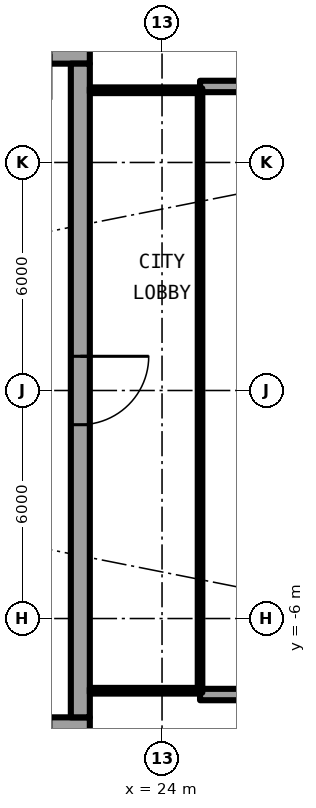
"""IFC4 building model, lengths in metres.
Left out: names, types, materials, properties, quantities, classifications, styles, units other than length and angle.
Written with IfcOpenShell. Run it as: python <this file> out.ifc"""

import sys

from ifc_helpers import new_model, si_unit, direction, frame, frame_2d, origin, place, context, subcontext, project, spatial, rectangle, extrude, element, fill, save


model = new_model("IFC4")
c1 = context("Model", 3, precision=1e-05, world=origin(), true_north=direction((0.0, 1.0)))
c2 = subcontext(c1, "Body", "Model", "MODEL_VIEW")
j1 = project(units=[si_unit("LENGTHUNIT", "METRE"), si_unit("PLANEANGLEUNIT", "RADIAN")], contexts=[c1])
p1 = place(None, origin())
s1 = spatial("IfcSite", under=j1, at=p1, CompositionType="ELEMENT")
p2 = place(p1, origin())
s2 = spatial("IfcBuilding", under=s1, at=p2, CompositionType="ELEMENT")
p3 = place(p2, frame((0.0, 0.0, 161.6)))
s3 = spatial("IfcBuildingStorey", under=s2, at=p3, CompositionType="ELEMENT", Elevation=161.6)
for number, where, z_axis, x_axis in (
    (1, (25.0, 8.0, 0.0), (0.0, 0.0, 1.0), (1.0, 0.0, 0.0)),
    (2, (25.0, -8.0, 0.0), (0.0, 0.0, 1.0), (1.0, 0.0, 0.0)),
):
    element("IfcWall", number, at=place(p3, frame(where, z_axis=z_axis, x_axis=x_axis)), inside=s3, PredefinedType="SOLIDWALL", context=c2, shape_type="SweptSolid", body=[
        extrude(rectangle(XDim=2.667, YDim=0.3, at=frame_2d((1.333, 0.0))), origin(), (0.0, 0.0, 1.0), 2.7),
    ])
p4 = place(p3, frame((22.1, 8.85, 0.0), z_axis=(0.0, 0.0, 1.0), x_axis=(-1.0, 0.0, 0.0)))
e3 = element("IfcWall", 3, at=p4, inside=s3, PredefinedType="SHEAR", context=c2, shape_type="SweptSolid", body=[
    extrude(rectangle(XDim=13.6, YDim=0.5, at=frame_2d((6.8, 0.0))), origin(), (0.0, 0.0, 1.0), 3.05),
])
p5 = place(p4, frame((1.025, 0.0, 0.0)))
e4 = element("IfcOpeningElement", 4, at=p5, cuts=e3, PredefinedType="OPENING", context=c2, shape_type="SweptSolid", body=[
    extrude(rectangle(XDim=1.2, YDim=2.3, at=frame_2d((0.6, 1.15))), frame((0.0, 0.26, 0.0), z_axis=(0.0, -1.0, 0.0), x_axis=(1.0, 0.0, 0.0)), (0.0, 0.0, 1.0), 0.52),
])
p6 = place(p3, frame((8.5, -8.85, 0.0), z_axis=(0.0, 0.0, 1.0), x_axis=(1.0, 0.0, 0.0)))
e5 = element("IfcWall", 5, at=p6, inside=s3, PredefinedType="SHEAR", context=c2, shape_type="SweptSolid", body=[
    extrude(rectangle(XDim=13.6, YDim=0.5, at=frame_2d((6.8, 0.0))), origin(), (0.0, 0.0, 1.0), 3.05),
])
p7 = place(p6, frame((11.375, 0.0, 0.0)))
e6 = element("IfcOpeningElement", 6, at=p7, cuts=e5, PredefinedType="OPENING", context=c2, shape_type="SweptSolid", body=[
    extrude(rectangle(XDim=1.2, YDim=2.3, at=frame_2d((0.6, 1.15))), frame((0.0, 0.26, 0.0), z_axis=(0.0, -1.0, 0.0), x_axis=(1.0, 0.0, 0.0)), (0.0, 0.0, 1.0), 0.52),
])
p8 = place(p3, frame((21.85, 8.6, 0.0), z_axis=(0.0, 0.0, 1.0), x_axis=(0.0, -1.0, 0.0)))
e7 = element("IfcWall", 7, at=p8, inside=s3, PredefinedType="SHEAR", context=c2, shape_type="SweptSolid", body=[
    extrude(rectangle(XDim=17.2, YDim=0.5, at=frame_2d((8.6, 0.0))), origin(), (0.0, 0.0, 1.0), 3.05),
])
p9 = place(p8, frame((7.7, 0.0, 0.0)))
e8 = element("IfcOpeningElement", 8, at=p9, cuts=e7, PredefinedType="OPENING", context=c2, shape_type="SweptSolid", body=[
    extrude(rectangle(XDim=1.8, YDim=2.3, at=frame_2d((0.9, 1.15))), frame((0.0, 0.26, 0.0), z_axis=(0.0, -1.0, 0.0), x_axis=(1.0, 0.0, 0.0)), (0.0, 0.0, 1.0), 0.52),
])
for number, where, z_axis, x_axis in (
    (9, (22.1, -7.9, 0.0), (0.0, 0.0, 1.0), (1.0, 0.0, 0.0)),
    (10, (22.1, 7.9, 0.0), (0.0, 0.0, 1.0), (1.0, 0.0, 0.0)),
):
    element("IfcWall", number, at=place(p3, frame(where, z_axis=z_axis, x_axis=x_axis)), inside=s3, PredefinedType="PARTITIONING", context=c2, shape_type="SweptSolid", body=[
        extrude(rectangle(XDim=2.84, YDim=0.15, at=frame_2d((1.42, 0.0))), origin(), (0.0, 0.0, 1.0), 2.7),
    ])
p10 = place(p3, frame((25.0, -7.95, 0.0), z_axis=(0.0, 0.0, 1.0), x_axis=(0.0, 1.0, 0.0)))
e11 = element("IfcWall", 11, at=p10, inside=s3, PredefinedType="PARTITIONING", context=c2, shape_type="SweptSolid", body=[
    extrude(rectangle(XDim=15.9, YDim=0.12, at=frame_2d((7.95, 0.0))), origin(), (0.0, 0.0, 1.0), 2.7),
])
p11 = place(p10, frame((0.95, 0.0, 0.1)))
e12 = element("IfcOpeningElement", 12, at=p11, cuts=e11, PredefinedType="OPENING", context=c2, shape_type="SweptSolid", body=[
    extrude(rectangle(XDim=14.0, YDim=2.35, at=frame_2d((7.0, 1.175))), frame((0.0, 0.07, 0.0), z_axis=(0.0, -1.0, 0.0), x_axis=(1.0, 0.0, 0.0)), (0.0, 0.0, 1.0), 0.14),
])
p12 = place(p9, origin())
e13 = element("IfcDoor", 13, at=p12, inside=s3, OperationType="SINGLE_SWING_LEFT", PredefinedType="DOOR", context=c2, shape_type="SweptSolid", body=[
    extrude(rectangle(XDim=1.8, YDim=2.3, at=frame_2d((0.9, 1.15))), frame((0.0, 0.025, 0.0), z_axis=(0.0, -1.0, 0.0), x_axis=(1.0, 0.0, 0.0)), (0.0, 0.0, 1.0), 0.05),
])
fill(e8, e13)
p13 = place(p11, origin())
e14 = element("IfcWindow", 14, at=p13, inside=s3, PartitioningType="SINGLE_PANEL", PredefinedType="WINDOW", context=c2, shape_type="SweptSolid", body=[
    extrude(rectangle(XDim=14.0, YDim=2.35, at=frame_2d((7.0, 1.175))), frame((0.0, 0.03, 0.0), z_axis=(0.0, -1.0, 0.0), x_axis=(1.0, 0.0, 0.0)), (0.0, 0.0, 1.0), 0.06),
])
fill(e12, e14)
save(model, sys.argv[1])
